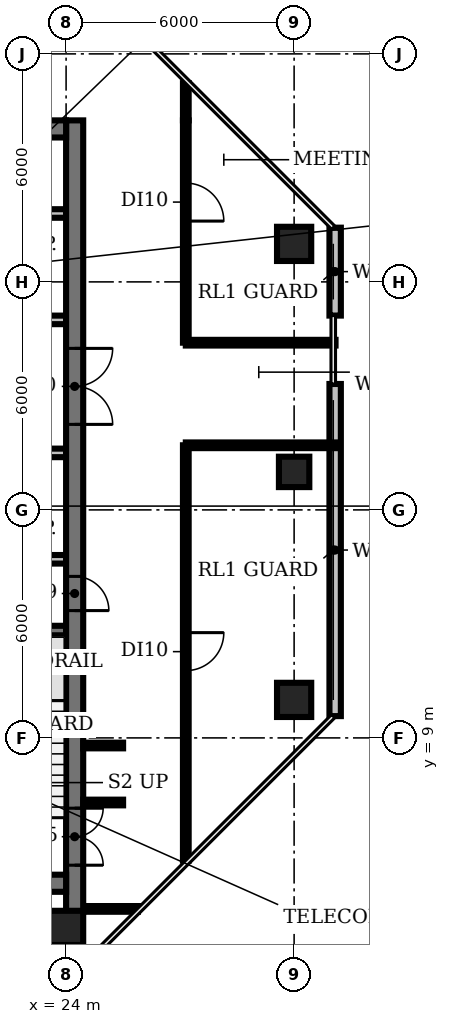
"""IFC4 building model, lengths in metres.
Left out: names, types, materials, properties, quantities, classifications, styles, units other than length and angle.
Written with IfcOpenShell. Run it as: python <this file> out.ifc"""

import sys

from ifc_helpers import new_model, si_unit, direction, frame, frame_2d, origin, origin_2d, place, context, subcontext, project, spatial, rectangle, circle, extrude, element, fill, save


model = new_model("IFC4")
c1 = context("Model", 3, precision=1e-05, world=origin(), true_north=direction((0.0, 1.0)))
c2 = subcontext(c1, "Body", "Model", "MODEL_VIEW")
j1 = project(units=[si_unit("LENGTHUNIT", "METRE"), si_unit("PLANEANGLEUNIT", "RADIAN")], contexts=[c1])
p1 = place(None, origin())
s1 = spatial("IfcSite", under=j1, at=p1, CompositionType="ELEMENT")
p2 = place(p1, origin())
s2 = spatial("IfcBuilding", under=s1, at=p2, CompositionType="ELEMENT")
p3 = place(p2, frame((0.0, 0.0, 234.8)))
s3 = spatial("IfcBuildingStorey", under=s2, at=p3, CompositionType="ELEMENT", Elevation=234.8)
for number, where, z_axis, x_axis in (
    (1, (24.0, 4.0, 0.0), (0.0, 0.0, 1.0), (1.0, 0.0, 0.0)),
    (2, (30.0, 10.0, 0.0), (0.0, 0.0, 1.0), (1.0, 0.0, 0.0)),
):
    element("IfcColumn", number, at=place(p3, frame(where, z_axis=z_axis, x_axis=x_axis)), inside=s3, PredefinedType="COLUMN", context=c2, shape_type="SweptSolid", body=[
        extrude(circle(Radius=0.45, at=origin_2d()), origin(), (0.0, 0.0, 1.0), 3.85),
    ])
p4 = place(p3, frame((30.0, 16.0, 0.0), z_axis=(0.0, 0.0, 1.0), x_axis=(1.0, 0.0, 0.0)))
e3 = element("IfcColumn", 3, at=p4, inside=s3, PredefinedType="COLUMN", context=c2, shape_type="SweptSolid", body=[
    extrude(rectangle(XDim=0.8, YDim=0.8, at=origin_2d()), origin(), (0.0, 0.0, 1.0), 3.85),
])
p5 = place(p3, frame((30.0, 22.0, 0.0), z_axis=(0.0, 0.0, 1.0), x_axis=(1.0, 0.0, 0.0)))
e4 = element("IfcColumn", 4, at=p5, inside=s3, PredefinedType="COLUMN", context=c2, shape_type="SweptSolid", body=[
    extrude(circle(Radius=0.45, at=origin_2d()), origin(), (0.0, 0.0, 1.0), 3.85),
])
p6 = place(p3, frame((31.08, 9.573, 0.0), z_axis=(0.0, 0.0, 1.0), x_axis=(0.0, 1.0, 0.0)))
e5 = element("IfcWall", 5, at=p6, inside=s3, PredefinedType="SOLIDWALL", context=c2, shape_type="SweptSolid", body=[
    extrude(rectangle(XDim=8.74, YDim=0.3, at=frame_2d((4.37, 0.0))), origin(), (0.0, 0.0, 1.0), 3.85),
])
p7 = place(p3, frame((31.08, 20.113, 0.0), z_axis=(0.0, 0.0, 1.0), x_axis=(0.0, 1.0, 0.0)))
e6 = element("IfcWall", 6, at=p7, inside=s3, PredefinedType="SOLIDWALL", context=c2, shape_type="SweptSolid", body=[
    extrude(rectangle(XDim=2.313, YDim=0.3, at=frame_2d((1.157, 0.0))), origin(), (0.0, 0.0, 1.0), 3.85),
])
p8 = place(p3, frame((20.85, 11.825, 0.0), z_axis=(0.0, 0.0, 1.0), x_axis=(1.0, 0.0, 0.0)))
e7 = element("IfcWall", 7, at=p8, inside=s3, PredefinedType="SHEAR", context=c2, shape_type="SweptSolid", body=[
    extrude(rectangle(XDim=3.15, YDim=0.25, at=frame_2d((1.575, 0.0))), origin(), (0.0, 0.0, 1.0), 3.85),
])
p9 = place(p3, frame((16.6, 13.7, 0.0), z_axis=(0.0, 0.0, 1.0), x_axis=(1.0, 0.0, 0.0)))
e8 = element("IfcWall", 8, at=p9, inside=s3, PredefinedType="PARTITIONING", context=c2, shape_type="SweptSolid", body=[
    extrude(rectangle(XDim=7.4, YDim=0.225, at=frame_2d((3.7, 0.0))), origin(), (0.0, 0.0, 1.0), 3.85),
])
p10 = place(p3, frame((9.4, 16.5, 0.0), z_axis=(0.0, 0.0, 1.0), x_axis=(1.0, 0.0, 0.0)))
e9 = element("IfcWall", 9, at=p10, inside=s3, PredefinedType="PARTITIONING", context=c2, shape_type="SweptSolid", body=[
    extrude(rectangle(XDim=14.6, YDim=0.225, at=frame_2d((7.3, 0.0))), origin(), (0.0, 0.0, 1.0), 3.85),
])
p11 = place(p10, frame((1.6, 0.0, 0.0)))
e10 = element("IfcOpeningElement", 10, at=p11, cuts=e9, PredefinedType="OPENING", context=c2, shape_type="SweptSolid", body=[
    extrude(rectangle(XDim=1.0, YDim=2.1, at=frame_2d((0.5, 1.05))), frame((0.0, 0.123, 0.0), z_axis=(0.0, -1.0, 0.0), x_axis=(1.0, 0.0, 0.0)), (0.0, 0.0, 1.0), 0.245),
])
p12 = place(p10, frame((5.125, 0.0, 0.0)))
e11 = element("IfcOpeningElement", 11, at=p12, cuts=e9, PredefinedType="OPENING", context=c2, shape_type="SweptSolid", body=[
    extrude(rectangle(XDim=0.9, YDim=2.1, at=frame_2d((0.45, 1.05))), frame((0.0, 0.123, 0.0), z_axis=(0.0, -1.0, 0.0), x_axis=(1.0, 0.0, 0.0)), (0.0, 0.0, 1.0), 0.245),
])
p13 = place(p10, frame((7.675, 0.0, 0.0)))
e12 = element("IfcOpeningElement", 12, at=p13, cuts=e9, PredefinedType="OPENING", context=c2, shape_type="SweptSolid", body=[
    extrude(rectangle(XDim=0.9, YDim=2.1, at=frame_2d((0.45, 1.05))), frame((0.0, 0.123, 0.0), z_axis=(0.0, -1.0, 0.0), x_axis=(1.0, 0.0, 0.0)), (0.0, 0.0, 1.0), 0.245),
])
p14 = place(p10, frame((9.775, 0.0, 0.0)))
e13 = element("IfcOpeningElement", 13, at=p14, cuts=e9, PredefinedType="OPENING", context=c2, shape_type="SweptSolid", body=[
    extrude(rectangle(XDim=0.9, YDim=2.1, at=frame_2d((0.45, 1.05))), frame((0.0, 0.123, 0.0), z_axis=(0.0, -1.0, 0.0), x_axis=(1.0, 0.0, 0.0)), (0.0, 0.0, 1.0), 0.245),
])
p15 = place(p10, frame((12.4, 0.0, 0.0)))
e14 = element("IfcOpeningElement", 14, at=p15, cuts=e9, PredefinedType="OPENING", context=c2, shape_type="SweptSolid", body=[
    extrude(rectangle(XDim=1.0, YDim=2.1, at=frame_2d((0.5, 1.05))), frame((0.0, 0.123, 0.0), z_axis=(0.0, -1.0, 0.0), x_axis=(1.0, 0.0, 0.0)), (0.0, 0.0, 1.0), 0.245),
])
p16 = place(p3, frame((24.0, 20.0, 0.0), z_axis=(0.0, 0.0, 1.0), x_axis=(-1.0, 0.0, 0.0)))
e15 = element("IfcWall", 15, at=p16, inside=s3, PredefinedType="PARTITIONING", context=c2, shape_type="SweptSolid", body=[
    extrude(rectangle(XDim=14.6, YDim=0.225, at=frame_2d((7.3, 0.0))), origin(), (0.0, 0.0, 1.0), 3.85),
])
p17 = place(p16, frame((12.75, 0.0, 0.0)))
e16 = element("IfcOpeningElement", 16, at=p17, cuts=e15, PredefinedType="OPENING", context=c2, shape_type="SweptSolid", body=[
    extrude(rectangle(XDim=1.1, YDim=2.1, at=frame_2d((0.55, 1.05))), frame((0.0, 0.123, 0.0), z_axis=(0.0, -1.0, 0.0), x_axis=(1.0, 0.0, 0.0)), (0.0, 0.0, 1.0), 0.245),
])
p18 = place(p16, frame((9.95, 0.0, 0.0)))
e17 = element("IfcOpeningElement", 17, at=p18, cuts=e15, PredefinedType="OPENING", context=c2, shape_type="SweptSolid", body=[
    extrude(rectangle(XDim=1.1, YDim=2.1, at=frame_2d((0.55, 1.05))), frame((0.0, 0.123, 0.0), z_axis=(0.0, -1.0, 0.0), x_axis=(1.0, 0.0, 0.0)), (0.0, 0.0, 1.0), 0.245),
])
p19 = place(p16, frame((7.15, 0.0, 0.0)))
e18 = element("IfcOpeningElement", 18, at=p19, cuts=e15, PredefinedType="OPENING", context=c2, shape_type="SweptSolid", body=[
    extrude(rectangle(XDim=1.1, YDim=2.1, at=frame_2d((0.55, 1.05))), frame((0.0, 0.123, 0.0), z_axis=(0.0, -1.0, 0.0), x_axis=(1.0, 0.0, 0.0)), (0.0, 0.0, 1.0), 0.245),
])
p20 = place(p16, frame((4.35, 0.0, 0.0)))
e19 = element("IfcOpeningElement", 19, at=p20, cuts=e15, PredefinedType="OPENING", context=c2, shape_type="SweptSolid", body=[
    extrude(rectangle(XDim=1.1, YDim=2.1, at=frame_2d((0.55, 1.05))), frame((0.0, 0.123, 0.0), z_axis=(0.0, -1.0, 0.0), x_axis=(1.0, 0.0, 0.0)), (0.0, 0.0, 1.0), 0.245),
])
p21 = place(p16, frame((1.2, 0.0, 0.0)))
e20 = element("IfcOpeningElement", 20, at=p21, cuts=e15, PredefinedType="OPENING", context=c2, shape_type="SweptSolid", body=[
    extrude(rectangle(XDim=1.0, YDim=2.1, at=frame_2d((0.5, 1.05))), frame((0.0, 0.123, 0.0), z_axis=(0.0, -1.0, 0.0), x_axis=(1.0, 0.0, 0.0)), (0.0, 0.0, 1.0), 0.245),
])
p22 = place(p3, frame((9.4, 22.8, 0.0), z_axis=(0.0, 0.0, 1.0), x_axis=(1.0, 0.0, 0.0)))
e21 = element("IfcWall", 21, at=p22, inside=s3, PredefinedType="PARTITIONING", context=c2, shape_type="SweptSolid", body=[
    extrude(rectangle(XDim=14.6, YDim=0.225, at=frame_2d((7.3, 0.0))), origin(), (0.0, 0.0, 1.0), 3.85),
])
p23 = place(p3, frame((24.225, 25.25, 0.0), z_axis=(0.0, 0.0, 1.0), x_axis=(0.0, -1.0, 0.0)))
e22 = element("IfcWall", 22, at=p23, inside=s3, PredefinedType="SHEAR", context=c2, shape_type="SweptSolid", body=[
    extrude(rectangle(XDim=20.83, YDim=0.45, at=frame_2d((10.415, 0.0))), origin(), (0.0, 0.0, 1.0), 3.85),
])
p24 = place(p23, frame((18.1, 0.0, 0.0)))
e23 = element("IfcOpeningElement", 23, at=p24, cuts=e22, PredefinedType="OPENING", context=c2, shape_type="SweptSolid", body=[
    extrude(rectangle(XDim=1.5, YDim=2.1, at=frame_2d((0.75, 1.05))), frame((0.0, 0.235, 0.0), z_axis=(0.0, -1.0, 0.0), x_axis=(1.0, 0.0, 0.0)), (0.0, 0.0, 1.0), 0.47),
])
p25 = place(p23, frame((12.0, 0.0, 0.0)))
e24 = element("IfcOpeningElement", 24, at=p25, cuts=e22, PredefinedType="OPENING", context=c2, shape_type="SweptSolid", body=[
    extrude(rectangle(XDim=0.9, YDim=2.1, at=frame_2d((0.45, 1.05))), frame((0.0, 0.235, 0.0), z_axis=(0.0, -1.0, 0.0), x_axis=(1.0, 0.0, 0.0)), (0.0, 0.0, 1.0), 0.47),
])
p26 = place(p23, frame((6.0, 0.0, 0.0)))
e25 = element("IfcOpeningElement", 25, at=p26, cuts=e22, PredefinedType="OPENING", context=c2, shape_type="SweptSolid", body=[
    extrude(rectangle(XDim=2.0, YDim=2.1, at=frame_2d((1.0, 1.05))), frame((0.0, 0.235, 0.0), z_axis=(0.0, -1.0, 0.0), x_axis=(1.0, 0.0, 0.0)), (0.0, 0.0, 1.0), 0.47),
])
p27 = place(p3, frame((24.0, 5.175, 0.0), z_axis=(0.0, 0.0, 1.0), x_axis=(-1.0, 0.0, 0.0)))
e26 = element("IfcWall", 26, at=p27, inside=s3, PredefinedType="SHEAR", context=c2, shape_type="SweptSolid", body=[
    extrude(rectangle(XDim=18.0, YDim=0.45, at=frame_2d((9.0, 0.0))), origin(), (0.0, 0.0, 1.0), 3.85),
])
p28 = place(p27, frame((0.825, 0.0, 0.0)))
e27 = element("IfcOpeningElement", 27, at=p28, cuts=e26, PredefinedType="OPENING", context=c2, shape_type="SweptSolid", body=[
    extrude(rectangle(XDim=1.5, YDim=2.1, at=frame_2d((0.75, 1.05))), frame((0.0, 0.235, 0.0), z_axis=(0.0, -1.0, 0.0), x_axis=(1.0, 0.0, 0.0)), (0.0, 0.0, 1.0), 0.47),
])
p29 = place(p27, frame((15.675, 0.0, 0.0)))
e28 = element("IfcOpeningElement", 28, at=p29, cuts=e26, PredefinedType="OPENING", context=c2, shape_type="SweptSolid", body=[
    extrude(rectangle(XDim=1.5, YDim=2.1, at=frame_2d((0.75, 1.05))), frame((0.0, 0.235, 0.0), z_axis=(0.0, -1.0, 0.0), x_axis=(1.0, 0.0, 0.0)), (0.0, 0.0, 1.0), 0.47),
])
p30 = place(p27, frame((13.0, 0.0, 0.0)))
e29 = element("IfcOpeningElement", 29, at=p30, cuts=e26, PredefinedType="OPENING", context=c2, shape_type="SweptSolid", body=[
    extrude(rectangle(XDim=1.2, YDim=2.1, at=frame_2d((0.6, 1.05))), frame((0.0, 0.235, 0.0), z_axis=(0.0, -1.0, 0.0), x_axis=(1.0, 0.0, 0.0)), (0.0, 0.0, 1.0), 0.47),
])
p31 = place(p27, frame((4.4, 0.0, 0.0)))
e30 = element("IfcOpeningElement", 30, at=p31, cuts=e26, PredefinedType="OPENING", context=c2, shape_type="SweptSolid", body=[
    extrude(rectangle(XDim=1.0, YDim=2.1, at=frame_2d((0.5, 1.05))), frame((0.0, 0.235, 0.0), z_axis=(0.0, -1.0, 0.0), x_axis=(1.0, 0.0, 0.0)), (0.0, 0.0, 1.0), 0.47),
])
p32 = place(p3, frame((6.0, 25.025, 0.0), z_axis=(0.0, 0.0, 1.0), x_axis=(1.0, 0.0, 0.0)))
e31 = element("IfcWall", 31, at=p32, inside=s3, PredefinedType="SHEAR", context=c2, shape_type="SweptSolid", body=[
    extrude(rectangle(XDim=18.0, YDim=0.45, at=frame_2d((9.0, 0.0))), origin(), (0.0, 0.0, 1.0), 3.85),
])
for number, where, z_axis, x_axis in (
    (32, (24.45, 7.3, 0.0), (0.0, 0.0, 1.0), (1.0, 0.0, 0.0)),
    (33, (24.45, 8.8, 0.0), (0.0, 0.0, 1.0), (1.0, 0.0, 0.0)),
):
    element("IfcWall", number, at=place(p3, frame(where, z_axis=z_axis, x_axis=x_axis)), inside=s3, PredefinedType="PARTITIONING", context=c2, shape_type="SweptSolid", body=[
        extrude(rectangle(XDim=1.05, YDim=0.15, at=frame_2d((0.525, 0.0))), origin(), (0.0, 0.0, 1.0), 2.88),
    ])
p33 = place(p3, frame((24.55, 4.5, 0.0), z_axis=(0.0, 0.0, 1.0), x_axis=(1.0, 0.0, 0.0)))
e34 = element("IfcWall", 34, at=p33, inside=s3, PredefinedType="PARTITIONING", context=c2, shape_type="SweptSolid", body=[
    extrude(rectangle(XDim=1.34, YDim=0.15, at=frame_2d((0.67, 0.0))), origin(), (0.0, 0.0, 1.0), 2.88),
])
p34 = place(p3, frame((27.15, 16.7, 0.0), z_axis=(0.0, 0.0, 1.0), x_axis=(0.0, -1.0, 0.0)))
e35 = element("IfcWall", 35, at=p34, inside=s3, PredefinedType="PARTITIONING", context=c2, shape_type="SweptSolid", body=[
    extrude(rectangle(XDim=10.93, YDim=0.15, at=frame_2d((5.465, 0.0))), origin(), (0.0, 0.0, 1.0), 2.88),
])
p35 = place(p34, frame((4.93, 0.0, 0.0)))
e36 = element("IfcOpeningElement", 36, at=p35, cuts=e35, PredefinedType="OPENING", context=c2, shape_type="SweptSolid", body=[
    extrude(rectangle(XDim=1.0, YDim=2.1, at=frame_2d((0.5, 1.05))), frame((0.0, 0.085, 0.0), z_axis=(0.0, -1.0, 0.0), x_axis=(1.0, 0.0, 0.0)), (0.0, 0.0, 1.0), 0.17),
])
for number, where, z_axis, x_axis in (
    (37, (27.15, 16.7, 0.0), (0.0, 0.0, 1.0), (1.0, 0.0, 0.0)),
    (38, (27.15, 19.4, 0.0), (0.0, 0.0, 1.0), (1.0, 0.0, 0.0)),
):
    element("IfcWall", number, at=place(p3, frame(where, z_axis=z_axis, x_axis=x_axis)), inside=s3, PredefinedType="PARTITIONING", context=c2, shape_type="SweptSolid", body=[
        extrude(rectangle(XDim=3.94, YDim=0.15, at=frame_2d((1.97, 0.0))), origin(), (0.0, 0.0, 1.0), 2.88),
    ])
p36 = place(p3, frame((27.15, 25.25, 0.0), z_axis=(0.0, 0.0, 1.0), x_axis=(0.0, -1.0, 0.0)))
e39 = element("IfcWall", 39, at=p36, inside=s3, PredefinedType="PARTITIONING", context=c2, shape_type="SweptSolid", body=[
    extrude(rectangle(XDim=5.85, YDim=0.15, at=frame_2d((2.925, 0.0))), origin(), (0.0, 0.0, 1.0), 2.88),
])
p37 = place(p36, frame((1.65, 0.0, 0.0)))
e40 = element("IfcOpeningElement", 40, at=p37, cuts=e39, PredefinedType="OPENING", context=c2, shape_type="SweptSolid", body=[
    extrude(rectangle(XDim=1.0, YDim=2.1, at=frame_2d((0.5, 1.05))), frame((0.0, 0.085, 0.0), z_axis=(0.0, -1.0, 0.0), x_axis=(1.0, 0.0, 0.0)), (0.0, 0.0, 1.0), 0.17),
])
p38 = place(p3, frame((27.15, 25.25, 0.0), z_axis=(0.0, 0.0, 1.0), x_axis=(0.0, 1.0, 0.0)))
e41 = element("IfcWall", 41, at=p38, inside=s3, PredefinedType="PARTITIONING", context=c2, shape_type="SweptSolid", body=[
    extrude(rectangle(XDim=0.98, YDim=0.15, at=frame_2d((0.49, 0.0))), origin(), (0.0, 0.0, 1.0), 2.88),
])
p39 = place(p24, origin())
e42 = element("IfcDoor", 42, at=p39, inside=s3, OperationType="DOUBLE_DOOR_SINGLE_SWING", PredefinedType="DOOR", context=c2, shape_type="SweptSolid", body=[
    extrude(rectangle(XDim=1.5, YDim=2.1, at=frame_2d((0.75, 1.05))), frame((0.0, 0.025, 0.0), z_axis=(0.0, -1.0, 0.0), x_axis=(1.0, 0.0, 0.0)), (0.0, 0.0, 1.0), 0.05),
])
fill(e23, e42)
p40 = place(p25, origin())
e43 = element("IfcDoor", 43, at=p40, inside=s3, OperationType="SINGLE_SWING_RIGHT", PredefinedType="DOOR", context=c2, shape_type="SweptSolid", body=[
    extrude(rectangle(XDim=0.9, YDim=2.1, at=frame_2d((0.45, 1.05))), frame((0.0, 0.025, 0.0), z_axis=(0.0, -1.0, 0.0), x_axis=(1.0, 0.0, 0.0)), (0.0, 0.0, 1.0), 0.05),
])
fill(e24, e43)
p41 = place(p26, origin())
e44 = element("IfcDoor", 44, at=p41, inside=s3, OperationType="DOUBLE_DOOR_SINGLE_SWING", PredefinedType="DOOR", context=c2, shape_type="SweptSolid", body=[
    extrude(rectangle(XDim=2.0, YDim=2.1, at=frame_2d((1.0, 1.05))), frame((0.0, 0.025, 0.0), z_axis=(0.0, -1.0, 0.0), x_axis=(1.0, 0.0, 0.0)), (0.0, 0.0, 1.0), 0.05),
])
fill(e25, e44)
p42 = place(p35, origin())
e45 = element("IfcDoor", 45, at=p42, inside=s3, OperationType="SINGLE_SWING_LEFT", PredefinedType="DOOR", context=c2, shape_type="SweptSolid", body=[
    extrude(rectangle(XDim=1.0, YDim=2.1, at=frame_2d((0.5, 1.05))), frame((0.0, 0.025, 0.0), z_axis=(0.0, -1.0, 0.0), x_axis=(1.0, 0.0, 0.0)), (0.0, 0.0, 1.0), 0.05),
])
fill(e36, e45)
p43 = place(p37, origin())
e46 = element("IfcDoor", 46, at=p43, inside=s3, OperationType="SINGLE_SWING_RIGHT", PredefinedType="DOOR", context=c2, shape_type="SweptSolid", body=[
    extrude(rectangle(XDim=1.0, YDim=2.1, at=frame_2d((0.5, 1.05))), frame((0.0, 0.025, 0.0), z_axis=(0.0, -1.0, 0.0), x_axis=(1.0, 0.0, 0.0)), (0.0, 0.0, 1.0), 0.05),
])
fill(e40, e46)
save(model, sys.argv[1])
